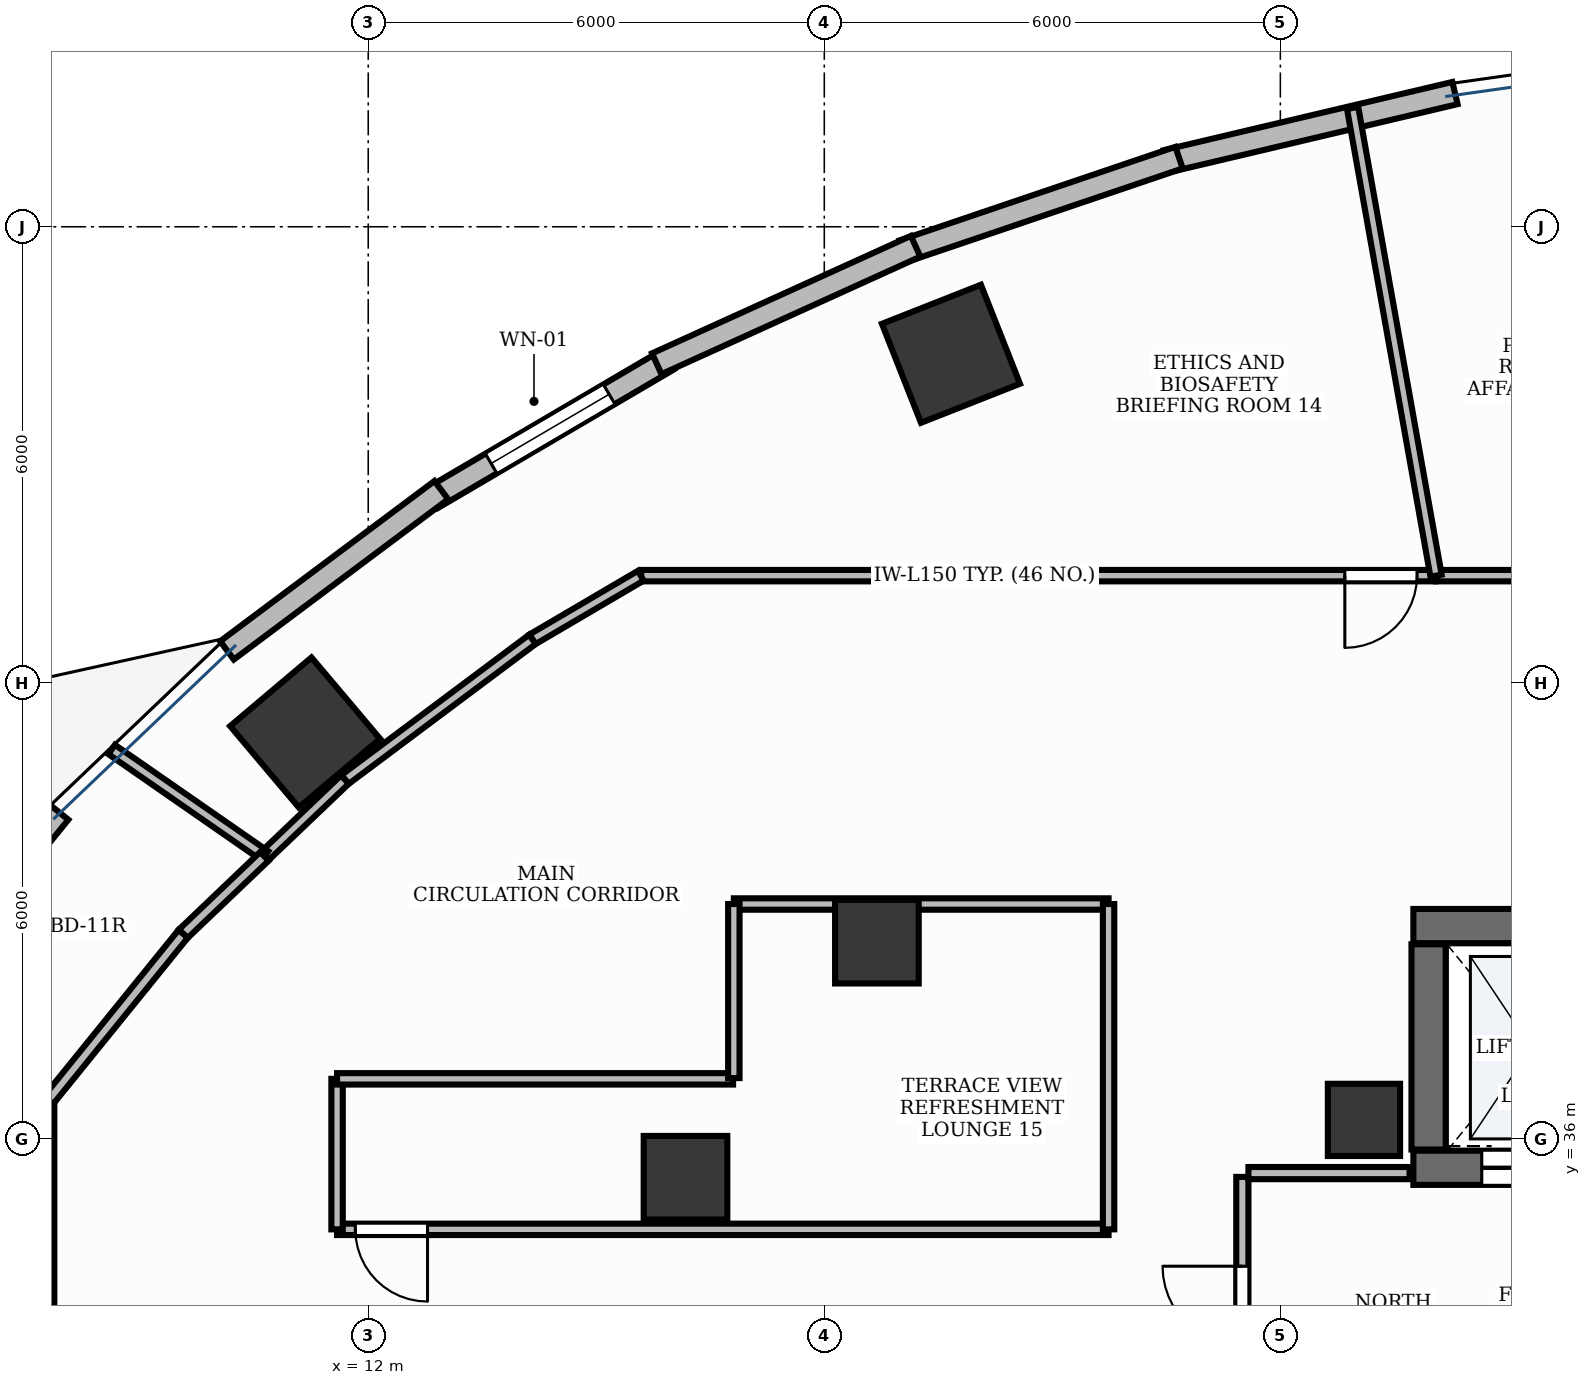
"""IFC4 building model, lengths in metres.
Left out: names, types, materials, properties, quantities, classifications, styles, units other than length and angle.
Written with IfcOpenShell. Run it as: python <this file> out.ifc"""

import sys

from ifc_helpers import new_model, si_unit, direction, frame, frame_2d, origin, origin_2d, place, context, subcontext, project, spatial, rectangle, extrude, element, fill, save


model = new_model("IFC4")
c1 = context("Model", 3, precision=1e-05, world=origin(), true_north=direction((0.0, 1.0)))
c2 = subcontext(c1, "Body", "Model", "MODEL_VIEW")
j1 = project(units=[si_unit("LENGTHUNIT", "METRE"), si_unit("PLANEANGLEUNIT", "RADIAN")], contexts=[c1])
p1 = place(None, origin())
s1 = spatial("IfcSite", under=j1, at=p1, CompositionType="ELEMENT")
p2 = place(p1, origin())
s2 = spatial("IfcBuilding", under=s1, at=p2, CompositionType="ELEMENT")
p3 = place(p2, frame((0.0, 0.0, 30.0)))
s3 = spatial("IfcBuildingStorey", under=s2, at=p3, CompositionType="ELEMENT", Elevation=30.0)
p4 = place(p3, frame((25.75, 38.8, 0.0), z_axis=(0.0, 0.0, 1.0), x_axis=(1.0, 0.0, 0.0)))
e1 = element("IfcWall", 1, at=p4, inside=s3, PredefinedType="SHEAR", context=c2, shape_type="SweptSolid", body=[
    extrude(rectangle(XDim=3.1, YDim=0.45, at=frame_2d((1.55, 0.0))), origin(), (0.0, 0.0, 1.0), 3.9),
])
p5 = place(p3, frame((25.75, 35.62, 0.0), z_axis=(0.0, 0.0, 1.0), x_axis=(1.0, 0.0, 0.0)))
e2 = element("IfcWall", 2, at=p5, inside=s3, PredefinedType="SHEAR", context=c2, shape_type="SweptSolid", body=[
    extrude(rectangle(XDim=3.1, YDim=0.45, at=frame_2d((1.55, 0.0))), origin(), (0.0, 0.0, 1.0), 3.9),
])
p6 = place(p5, frame((0.9, 0.0, 0.0)))
e3 = element("IfcOpeningElement", 3, at=p6, cuts=e2, PredefinedType="OPENING", context=c2, shape_type="SweptSolid", body=[
    extrude(rectangle(XDim=1.3, YDim=2.2, at=frame_2d((0.65, 1.1))), frame((0.0, 0.24, 0.0), z_axis=(0.0, -1.0, 0.0), x_axis=(1.0, 0.0, 0.0)), (0.0, 0.0, 1.0), 0.48),
])
p7 = place(p3, frame((25.95, 35.86, 0.0), z_axis=(0.0, 0.0, 1.0), x_axis=(0.0, 1.0, 0.0)))
e4 = element("IfcWall", 4, at=p7, inside=s3, PredefinedType="SHEAR", context=c2, shape_type="SweptSolid", body=[
    extrude(rectangle(XDim=2.7, YDim=0.45, at=frame_2d((1.35, 0.0))), origin(), (0.0, 0.0, 1.0), 3.9),
])
p8 = place(p3, frame((25.1, 36.25, -0.0), z_axis=(0.0, 0.0, 1.0), x_axis=(1.0, 0.0, 0.0)))
e5 = element("IfcColumn", 5, at=p8, inside=s3, PredefinedType="PILASTER", context=c2, shape_type="SweptSolid", body=[
    extrude(rectangle(XDim=0.95, YDim=0.95, at=origin_2d()), origin(), (0.0, 0.0, 1.0), 3.901),
])
for number, where, z_axis, x_axis in (
    (6, (19.667, 46.329, -0.0), (0.0, 0.0, 1.0), (0.93, 0.367, 0.0)),
    (7, (11.17, 41.347, -0.0), (0.0, 0.0, 1.0), (0.764, 0.645, 0.0)),
):
    element("IfcColumn", number, at=place(p3, frame(where, z_axis=z_axis, x_axis=x_axis)), inside=s3, PredefinedType="COLUMN", context=c2, shape_type="SweptSolid", body=[
        extrude(rectangle(XDim=1.4, YDim=1.4, at=origin_2d()), origin(), (0.0, 0.0, 1.0), 3.901),
    ])
for number, where, z_axis, x_axis in (
    (8, (18.692, 38.595, -0.0), (0.0, 0.0, 1.0), (1.0, 0.0, 0.0)),
    (9, (16.174, 35.489, -0.0), (0.0, 0.0, 1.0), (1.0, 0.0, 0.0)),
):
    element("IfcColumn", number, at=place(p3, frame(where, z_axis=z_axis, x_axis=x_axis)), inside=s3, PredefinedType="COLUMN", context=c2, shape_type="SweptSolid", body=[
        extrude(rectangle(XDim=1.1, YDim=1.1, at=origin_2d()), origin(), (0.0, 0.0, 1.0), 3.901),
    ])
p9 = place(p3, frame((15.944, 46.25, 0.0), z_axis=(0.0, 0.0, 1.0), x_axis=(-0.862473134325, -0.506102847817, 0.0)))
e10 = element("IfcWall", 10, at=p9, inside=s3, PredefinedType="STANDARD", context=c2, shape_type="SweptSolid", body=[
    extrude(rectangle(XDim=3.595, YDim=0.3, at=frame_2d((1.798, 0.0))), origin(), (0.0, 0.0, 1.0), 3.9),
])
p10 = place(p9, frame((0.898, 0.0, 0.9)))
e11 = element("IfcOpeningElement", 11, at=p10, cuts=e10, PredefinedType="OPENING", context=c2, shape_type="SweptSolid", body=[
    extrude(rectangle(XDim=1.8, YDim=2.1, at=frame_2d((0.9, 1.05))), frame((0.0, 0.165, 0.0), z_axis=(0.0, -1.0, 0.0), x_axis=(1.0, 0.0, 0.0)), (0.0, 0.0, 1.0), 0.33),
])
p11 = place(p3, frame((7.938, 40.294, 0.0), z_axis=(0.0, 0.0, 1.0), x_axis=(-0.629295540187, -0.777166084631, 0.0)))
e12 = element("IfcWall", 12, at=p11, inside=s3, PredefinedType="STANDARD", context=c2, shape_type="SweptSolid", body=[
    extrude(rectangle(XDim=3.248, YDim=0.3, at=frame_2d((1.624, 0.0))), origin(), (0.0, 0.0, 1.0), 3.9),
])
p12 = place(p11, frame((1.074, 0.0, 0.0)))
e13 = element("IfcOpeningElement", 13, at=p12, cuts=e12, PredefinedType="OPENING", context=c2, shape_type="SweptSolid", body=[
    extrude(rectangle(XDim=1.1, YDim=2.15, at=frame_2d((0.55, 1.075))), frame((0.0, 0.165, 0.0), z_axis=(0.0, -1.0, 0.0), x_axis=(1.0, 0.0, 0.0)), (0.0, 0.0, 1.0), 0.33),
])
p13 = place(p3, frame((26.297, 49.759, 0.0), z_axis=(0.0, 0.0, 1.0), x_axis=(-0.973197600754, -0.229970497863, 0.0)))
e14 = element("IfcWall", 14, at=p13, inside=s3, PredefinedType="STANDARD", context=c2, shape_type="SweptSolid", body=[
    extrude(rectangle(XDim=3.901, YDim=0.3, at=frame_2d((1.951, 0.0))), origin(), (0.0, 0.0, 1.0), 3.9),
])
p14 = place(p3, frame((22.667, 48.909, 0.0), z_axis=(0.0, 0.0, 1.0), x_axis=(-0.94702579403, -0.321157508773, 0.0)))
e15 = element("IfcWall", 15, at=p14, inside=s3, PredefinedType="STANDARD", context=c2, shape_type="SweptSolid", body=[
    extrude(rectangle(XDim=3.83, YDim=0.3, at=frame_2d((1.915, 0.0))), origin(), (0.0, 0.0, 1.0), 3.47),
])
p15 = place(p3, frame((19.201, 47.743, 0.0), z_axis=(0.0, 0.0, 1.0), x_axis=(-0.910623406862, -0.413237233166, 0.0)))
e16 = element("IfcWall", 16, at=p15, inside=s3, PredefinedType="STANDARD", context=c2, shape_type="SweptSolid", body=[
    extrude(rectangle(XDim=3.74, YDim=0.3, at=frame_2d((1.87, 0.0))), origin(), (0.0, 0.0, 1.0), 3.9),
])
p16 = place(p3, frame((12.961, 44.535, 0.0), z_axis=(0.0, 0.0, 1.0), x_axis=(-0.800823020995, -0.598901067827, 0.0)))
e17 = element("IfcWall", 17, at=p16, inside=s3, PredefinedType="STANDARD", context=c2, shape_type="SweptSolid", body=[
    extrude(rectangle(XDim=3.521, YDim=0.3, at=frame_2d((1.76, 0.0))), origin(), (0.0, 0.0, 1.0), 3.9),
])
p17 = place(p3, frame((23.5, 32.1, 0.0), z_axis=(0.0, 0.0, 1.0), x_axis=(0.0, 1.0, 0.0)))
e18 = element("IfcWall", 18, at=p17, inside=s3, PredefinedType="PARTITIONING", context=c2, shape_type="SweptSolid", body=[
    extrude(rectangle(XDim=3.4, YDim=0.16, at=frame_2d((1.7, 0.0))), origin(), (0.0, 0.0, 1.0), 2.91),
])
p18 = place(p17, frame((1.175, 0.0, 0.0)))
e19 = element("IfcOpeningElement", 19, at=p18, cuts=e18, PredefinedType="OPENING", context=c2, shape_type="SweptSolid", body=[
    extrude(rectangle(XDim=1.05, YDim=2.15, at=frame_2d((0.525, 1.075))), frame((0.0, 0.095, 0.0), z_axis=(0.0, -1.0, 0.0), x_axis=(1.0, 0.0, 0.0)), (0.0, 0.0, 1.0), 0.19),
])
p19 = place(p3, frame((23.58, 35.55, 0.0), z_axis=(0.0, 0.0, 1.0), x_axis=(1.0, 0.0, 0.0)))
e20 = element("IfcWall", 20, at=p19, inside=s3, PredefinedType="PARTITIONING", context=c2, shape_type="SweptSolid", body=[
    extrude(rectangle(XDim=2.12, YDim=0.16, at=frame_2d((1.06, 0.0))), origin(), (0.0, 0.0, 1.0), 2.91),
])
p20 = place(p3, frame((29.826, 43.41, 0.0), z_axis=(0.0, 0.0, 1.0), x_axis=(-1.0, 0.0, 0.0)))
e21 = element("IfcWall", 21, at=p20, inside=s3, PredefinedType="PARTITIONING", context=c2, shape_type="SweptSolid", body=[
    extrude(rectangle(XDim=3.777, YDim=0.15, at=frame_2d((1.889, 0.0))), origin(), (0.0, 0.0, 1.0), 2.91),
])
p21 = place(p20, frame((0.24, 0.0, 0.0)))
e22 = element("IfcOpeningElement", 22, at=p21, cuts=e21, PredefinedType="OPENING", context=c2, shape_type="SweptSolid", body=[
    extrude(rectangle(XDim=0.95, YDim=2.15, at=frame_2d((0.475, 1.075))), frame((0.0, 0.09, 0.0), z_axis=(0.0, -1.0, 0.0), x_axis=(1.0, 0.0, 0.0)), (0.0, 0.0, 1.0), 0.18),
])
p22 = place(p3, frame((26.038, 43.41, 0.0), z_axis=(0.0, 0.0, 1.0), x_axis=(-1.0, 0.0, 0.0)))
e23 = element("IfcWall", 23, at=p22, inside=s3, PredefinedType="PARTITIONING", context=c2, shape_type="SweptSolid", body=[
    extrude(rectangle(XDim=10.447, YDim=0.15, at=frame_2d((5.224, 0.0))), origin(), (0.0, 0.0, 1.0), 2.91),
])
p23 = place(p22, frame((0.24, 0.0, 0.0)))
e24 = element("IfcOpeningElement", 24, at=p23, cuts=e23, PredefinedType="OPENING", context=c2, shape_type="SweptSolid", body=[
    extrude(rectangle(XDim=0.95, YDim=2.15, at=frame_2d((0.475, 1.075))), frame((0.0, 0.09, 0.0), z_axis=(0.0, -1.0, 0.0), x_axis=(1.0, 0.0, 0.0)), (0.0, 0.0, 1.0), 0.18),
])
p24 = place(p3, frame((21.74, 34.81, 0.0), z_axis=(0.0, 0.0, 1.0), x_axis=(-1.0, 0.0, 0.0)))
e25 = element("IfcWall", 25, at=p24, inside=s3, PredefinedType="PARTITIONING", context=c2, shape_type="SweptSolid", body=[
    extrude(rectangle(XDim=10.15, YDim=0.15, at=frame_2d((5.075, 0.0))), origin(), (0.0, 0.0, 1.0), 2.91),
])
p25 = place(p24, frame((8.96, 0.0, 0.0)))
e26 = element("IfcOpeningElement", 26, at=p25, cuts=e25, PredefinedType="OPENING", context=c2, shape_type="SweptSolid", body=[
    extrude(rectangle(XDim=0.95, YDim=2.15, at=frame_2d((0.475, 1.075))), frame((0.0, 0.09, 0.0), z_axis=(0.0, -1.0, 0.0), x_axis=(1.0, 0.0, 0.0)), (0.0, 0.0, 1.0), 0.18),
])
p26 = place(p3, frame((7.79, 36.501, 0.0), z_axis=(0.0, 0.0, 1.0), x_axis=(0.0, -1.0, 0.0)))
e27 = element("IfcWall", 27, at=p26, inside=s3, PredefinedType="PARTITIONING", context=c2, shape_type="SweptSolid", body=[
    extrude(rectangle(XDim=8.478, YDim=0.16, at=frame_2d((4.239, 0.0))), origin(), (0.0, 0.0, 1.0), 2.91),
])
p27 = place(p26, frame((4.95, 0.0, 0.0)))
e28 = element("IfcOpeningElement", 28, at=p27, cuts=e27, PredefinedType="OPENING", context=c2, shape_type="SweptSolid", body=[
    extrude(rectangle(XDim=0.95, YDim=2.15, at=frame_2d((0.475, 1.075))), frame((0.0, 0.095, 0.0), z_axis=(0.0, -1.0, 0.0), x_axis=(1.0, 0.0, 0.0)), (0.0, 0.0, 1.0), 0.19),
])
p28 = place(p3, frame((26.048, 43.41, 0.0), z_axis=(0.0, 0.0, 1.0), x_axis=(-0.175605435055, 0.984460629573, 0.0)))
e29 = element("IfcWall", 29, at=p28, inside=s3, PredefinedType="PARTITIONING", context=c2, shape_type="SweptSolid", body=[
    extrude(rectangle(XDim=6.251, YDim=0.15, at=frame_2d((3.125, 0.0))), origin(), (0.0, 0.0, 1.0), 2.91),
])
p29 = place(p3, frame((15.586, 43.409, 0.0), z_axis=(0.0, 0.0, 1.0), x_axis=(-0.862446636904, -0.506148000582, 0.0)))
e30 = element("IfcWall", 30, at=p29, inside=s3, PredefinedType="PARTITIONING", context=c2, shape_type="SweptSolid", body=[
    extrude(rectangle(XDim=1.652, YDim=0.15, at=frame_2d((0.826, 0.0))), origin(), (0.0, 0.0, 1.0), 2.91),
])
p30 = place(p3, frame((14.16, 42.572, 0.0), z_axis=(0.0, 0.0, 1.0), x_axis=(-0.800808090092, -0.598921032227, 0.0)))
e31 = element("IfcWall", 31, at=p30, inside=s3, PredefinedType="PARTITIONING", context=c2, shape_type="SweptSolid", body=[
    extrude(rectangle(XDim=3.079, YDim=0.15, at=frame_2d((1.54, 0.0))), origin(), (0.0, 0.0, 1.0), 2.91),
])
p31 = place(p3, frame((11.693, 40.727, 0.0), z_axis=(0.0, 0.0, 1.0), x_axis=(-0.723614682185, -0.690204166697, 0.0)))
e32 = element("IfcWall", 32, at=p31, inside=s3, PredefinedType="PARTITIONING", context=c2, shape_type="SweptSolid", body=[
    extrude(rectangle(XDim=1.454, YDim=0.15, at=frame_2d((0.727, 0.0))), origin(), (0.0, 0.0, 1.0), 2.91),
])
p32 = place(p3, frame((10.641, 39.723, 0.0), z_axis=(0.0, 0.0, 1.0), x_axis=(-0.821561492386, 0.570119912149, 0.0)))
e33 = element("IfcWall", 33, at=p32, inside=s3, PredefinedType="PARTITIONING", context=c2, shape_type="SweptSolid", body=[
    extrude(rectangle(XDim=2.455, YDim=0.15, at=frame_2d((1.227, 0.0))), origin(), (0.0, 0.0, 1.0), 2.91),
])
p33 = place(p3, frame((16.81, 39.09, 0.0), z_axis=(0.0, 0.0, 1.0), x_axis=(1.0, 0.0, 0.0)))
e34 = element("IfcWall", 34, at=p33, inside=s3, PredefinedType="PARTITIONING", context=c2, shape_type="SweptSolid", body=[
    extrude(rectangle(XDim=4.93, YDim=0.15, at=frame_2d((2.465, 0.0))), origin(), (0.0, 0.0, 1.0), 2.91),
])
p34 = place(p3, frame((21.74, 39.09, 0.0), z_axis=(0.0, 0.0, 1.0), x_axis=(0.0, -1.0, 0.0)))
e35 = element("IfcWall", 35, at=p34, inside=s3, PredefinedType="PARTITIONING", context=c2, shape_type="SweptSolid", body=[
    extrude(rectangle(XDim=4.28, YDim=0.15, at=frame_2d((2.14, 0.0))), origin(), (0.0, 0.0, 1.0), 2.91),
])
p35 = place(p3, frame((11.59, 34.81, 0.0), z_axis=(0.0, 0.0, 1.0), x_axis=(0.0, 1.0, 0.0)))
e36 = element("IfcWall", 36, at=p35, inside=s3, PredefinedType="PARTITIONING", context=c2, shape_type="SweptSolid", body=[
    extrude(rectangle(XDim=1.98, YDim=0.15, at=frame_2d((0.99, 0.0))), origin(), (0.0, 0.0, 1.0), 2.91),
])
p36 = place(p3, frame((11.59, 36.79, 0.0), z_axis=(0.0, 0.0, 1.0), x_axis=(1.0, 0.0, 0.0)))
e37 = element("IfcWall", 37, at=p36, inside=s3, PredefinedType="PARTITIONING", context=c2, shape_type="SweptSolid", body=[
    extrude(rectangle(XDim=5.21, YDim=0.15, at=frame_2d((2.605, 0.0))), origin(), (0.0, 0.0, 1.0), 2.91),
])
p37 = place(p3, frame((16.81, 36.8, 0.0), z_axis=(0.0, 0.0, 1.0), x_axis=(0.0, 1.0, 0.0)))
e38 = element("IfcWall", 38, at=p37, inside=s3, PredefinedType="PARTITIONING", context=c2, shape_type="SweptSolid", body=[
    extrude(rectangle(XDim=2.29, YDim=0.15, at=frame_2d((1.145, 0.0))), origin(), (0.0, 0.0, 1.0), 2.91),
])
p38 = place(p3, frame((10.634, 39.717, 0.0), z_axis=(0.0, 0.0, 1.0), x_axis=(-0.723701031319, -0.690113626345, 0.0)))
e39 = element("IfcWall", 39, at=p38, inside=s3, PredefinedType="PARTITIONING", context=c2, shape_type="SweptSolid", body=[
    extrude(rectangle(XDim=1.476, YDim=0.16, at=frame_2d((0.738, 0.0))), origin(), (0.0, 0.0, 1.0), 2.91),
])
p39 = place(p3, frame((9.565, 38.697, 0.0), z_axis=(0.0, 0.0, 1.0), x_axis=(-0.629270515505, -0.777186347227, 0.0)))
e40 = element("IfcWall", 40, at=p39, inside=s3, PredefinedType="PARTITIONING", context=c2, shape_type="SweptSolid", body=[
    extrude(rectangle(XDim=2.817, YDim=0.16, at=frame_2d((1.409, 0.0))), origin(), (0.0, 0.0, 1.0), 2.91),
])
p40 = place(p10, origin())
e41 = element("IfcWindow", 41, at=p40, inside=s3, PartitioningType="SINGLE_PANEL", PredefinedType="WINDOW", context=c2, shape_type="SweptSolid", body=[
    extrude(rectangle(XDim=1.8, YDim=2.1, at=frame_2d((0.9, 1.05))), frame((0.0, 0.03, 0.0), z_axis=(0.0, -1.0, 0.0), x_axis=(1.0, 0.0, 0.0)), (0.0, 0.0, 1.0), 0.06),
])
fill(e11, e41)
p41 = place(p6, origin())
e42 = element("IfcDoor", 42, at=p41, inside=s3, OperationType="DOUBLE_DOOR_SLIDING", PredefinedType="DOOR", context=c2, shape_type="SweptSolid", body=[
    extrude(rectangle(XDim=1.3, YDim=2.2, at=frame_2d((0.65, 1.1))), frame((0.0, 0.025, 0.0), z_axis=(0.0, -1.0, 0.0), x_axis=(1.0, 0.0, 0.0)), (0.0, 0.0, 1.0), 0.05),
])
fill(e3, e42)
p42 = place(p18, origin())
e43 = element("IfcDoor", 43, at=p42, inside=s3, OperationType="SINGLE_SWING_RIGHT", PredefinedType="DOOR", context=c2, shape_type="SweptSolid", body=[
    extrude(rectangle(XDim=1.05, YDim=2.15, at=frame_2d((0.525, 1.075))), frame((0.0, 0.025, 0.0), z_axis=(0.0, -1.0, 0.0), x_axis=(1.0, 0.0, 0.0)), (0.0, 0.0, 1.0), 0.05),
])
fill(e19, e43)
p43 = place(p23, origin())
e44 = element("IfcDoor", 44, at=p43, inside=s3, OperationType="SINGLE_SWING_RIGHT", PredefinedType="DOOR", context=c2, shape_type="SweptSolid", body=[
    extrude(rectangle(XDim=0.95, YDim=2.15, at=frame_2d((0.475, 1.075))), frame((0.0, 0.025, 0.0), z_axis=(0.0, -1.0, 0.0), x_axis=(1.0, 0.0, 0.0)), (0.0, 0.0, 1.0), 0.05),
])
fill(e24, e44)
p44 = place(p25, origin())
e45 = element("IfcDoor", 45, at=p44, inside=s3, OperationType="SINGLE_SWING_LEFT", PredefinedType="DOOR", context=c2, shape_type="SweptSolid", body=[
    extrude(rectangle(XDim=0.95, YDim=2.15, at=frame_2d((0.475, 1.075))), frame((0.0, 0.025, 0.0), z_axis=(0.0, -1.0, 0.0), x_axis=(1.0, 0.0, 0.0)), (0.0, 0.0, 1.0), 0.05),
])
fill(e26, e45)
save(model, sys.argv[1])
